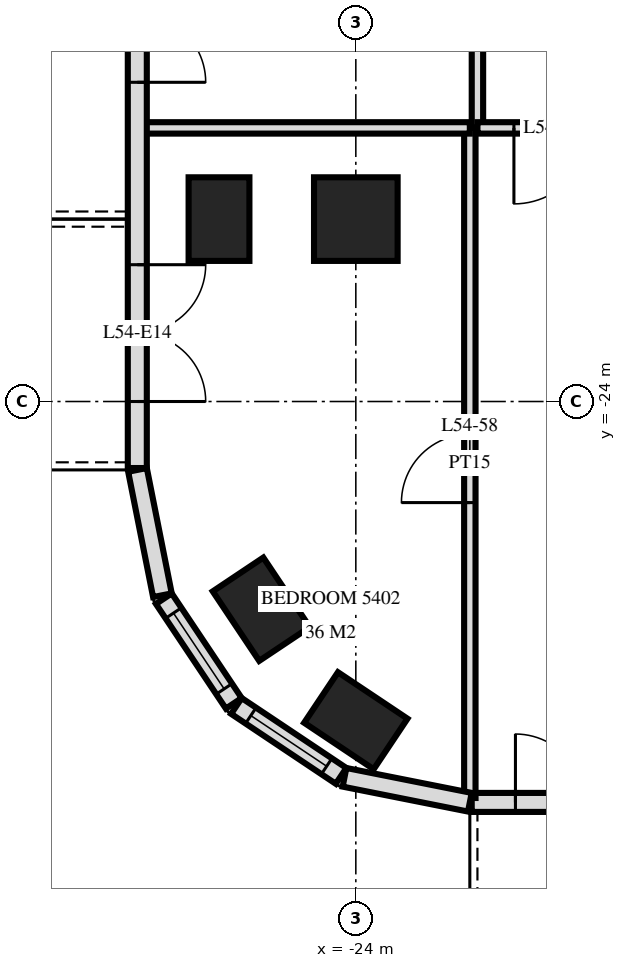
"""IFC4 building model, lengths in metres.
Left out: names, types, materials, properties, quantities, classifications, styles, units other than length and angle.
Written with IfcOpenShell. Run it as: python <this file> out.ifc"""

import sys

from ifc_helpers import new_model, si_unit, direction, frame, frame_2d, origin, origin_2d, place, context, subcontext, project, spatial, rectangle, extrude, element, fill, save


model = new_model("IFC4")
c1 = context("Model", 3, precision=1e-05, world=origin(), true_north=direction((0.0, 1.0)))
c2 = subcontext(c1, "Body", "Model", "MODEL_VIEW")
j1 = project(units=[si_unit("LENGTHUNIT", "METRE"), si_unit("PLANEANGLEUNIT", "RADIAN")], contexts=[c1])
p1 = place(None, origin())
s1 = spatial("IfcSite", under=j1, at=p1, CompositionType="ELEMENT")
p2 = place(p1, origin())
s2 = spatial("IfcBuilding", under=s1, at=p2, CompositionType="ELEMENT")
p3 = place(p2, frame((0.0, 0.0, 208.1)))
s3 = spatial("IfcBuildingStorey", under=s2, at=p3, CompositionType="ELEMENT", Elevation=208.1)
for number, where, z_axis, x_axis in (
    (1, (-25.8, -21.6, 0.0), (0.0, 0.0, 1.0), (0.0, 1.0, 0.0)),
    (2, (-25.244, -26.733, 0.0), (0.0, 0.0, 1.0), (-0.556, 0.831, 0.0)),
    (3, (-24.0, -28.2, 0.0), (0.0, 0.0, 1.0), (-0.831, 0.556, 0.0)),
):
    element("IfcColumn", number, at=place(p3, frame(where, z_axis=z_axis, x_axis=x_axis)), inside=s3, PredefinedType="COLUMN", context=c2, shape_type="SweptSolid", body=[
        extrude(rectangle(XDim=1.1, YDim=0.8, at=origin_2d()), origin(), (0.0, 0.0, 1.0), 3.5),
    ])
p4 = place(p3, frame((-24.0, -21.6, 0.0), z_axis=(0.0, 0.0, 1.0), x_axis=(1.0, 0.0, 0.0)))
e4 = element("IfcColumn", 4, at=p4, inside=s3, PredefinedType="COLUMN", context=c2, shape_type="SweptSolid", body=[
    extrude(rectangle(XDim=1.1, YDim=1.1, at=origin_2d()), origin(), (0.0, 0.0, 1.0), 3.5),
])
p5 = place(p3, frame((-26.875, -3.325, 0.0), z_axis=(0.0, 0.0, 1.0), x_axis=(0.0, -1.0, 0.0)))
e5 = element("IfcWall", 5, at=p5, inside=s3, PredefinedType="SOLIDWALL", context=c2, shape_type="SweptSolid", body=[
    extrude(rectangle(XDim=21.551, YDim=0.25, at=frame_2d((10.775, 0.0))), origin(), (0.0, 0.0, 1.0), 3.22),
])
p6 = place(p5, frame((6.65, 0.0, 0.0)))
e6 = element("IfcOpeningElement", 6, at=p6, cuts=e5, PredefinedType="OPENING", context=c2, shape_type="SweptSolid", body=[
    extrude(rectangle(XDim=1.8, YDim=2.4, at=frame_2d((0.9, 1.2))), frame((0.0, 0.135, 0.0), z_axis=(0.0, -1.0, 0.0), x_axis=(1.0, 0.0, 0.0)), (0.0, 0.0, 1.0), 0.27),
])
p7 = place(p5, frame((12.275, 0.0, 0.9)))
e7 = element("IfcOpeningElement", 7, at=p7, cuts=e5, PredefinedType="OPENING", context=c2, shape_type="SweptSolid", body=[
    extrude(rectangle(XDim=1.2, YDim=1.5, at=frame_2d((0.6, 0.75))), frame((0.0, 0.135, 0.0), z_axis=(0.0, -1.0, 0.0), x_axis=(1.0, 0.0, 0.0)), (0.0, 0.0, 1.0), 0.27),
])
p8 = place(p5, frame((14.675, 0.0, 0.0)))
e8 = element("IfcOpeningElement", 8, at=p8, cuts=e5, PredefinedType="OPENING", context=c2, shape_type="SweptSolid", body=[
    extrude(rectangle(XDim=1.8, YDim=2.4, at=frame_2d((0.9, 1.2))), frame((0.0, 0.135, 0.0), z_axis=(0.0, -1.0, 0.0), x_axis=(1.0, 0.0, 0.0)), (0.0, 0.0, 1.0), 0.27),
])
p9 = place(p5, frame((18.875, 0.0, 0.0)))
e9 = element("IfcOpeningElement", 9, at=p9, cuts=e5, PredefinedType="OPENING", context=c2, shape_type="SweptSolid", body=[
    extrude(rectangle(XDim=1.8, YDim=2.4, at=frame_2d((0.9, 1.2))), frame((0.0, 0.135, 0.0), z_axis=(0.0, -1.0, 0.0), x_axis=(1.0, 0.0, 0.0)), (0.0, 0.0, 1.0), 0.27),
])
p10 = place(p3, frame((-26.873, -24.9, 0.0), z_axis=(0.0, 0.0, 1.0), x_axis=(0.195026884138, -0.980797896849, 0.0)))
e10 = element("IfcWall", 10, at=p10, inside=s3, PredefinedType="SOLIDWALL", context=c2, shape_type="SweptSolid", body=[
    extrude(rectangle(XDim=1.681, YDim=0.25, at=frame_2d((0.841, 0.0))), origin(), (0.0, 0.0, 1.0), 3.22),
])
p11 = place(p3, frame((-26.526, -26.594, 0.0), z_axis=(0.0, 0.0, 1.0), x_axis=(0.55555029066, -0.831482937015, 0.0)))
e11 = element("IfcWall", 11, at=p11, inside=s3, PredefinedType="SOLIDWALL", context=c2, shape_type="SweptSolid", body=[
    extrude(rectangle(XDim=1.656, YDim=0.25, at=frame_2d((0.828, 0.0))), origin(), (0.0, 0.0, 1.0), 3.22),
])
p12 = place(p11, frame((0.228, 0.0, 0.9)))
e12 = element("IfcOpeningElement", 12, at=p12, cuts=e11, PredefinedType="OPENING", context=c2, shape_type="SweptSolid", body=[
    extrude(rectangle(XDim=1.2, YDim=1.5, at=frame_2d((0.6, 0.75))), frame((0.0, 0.135, 0.0), z_axis=(0.0, -1.0, 0.0), x_axis=(1.0, 0.0, 0.0)), (0.0, 0.0, 1.0), 0.27),
])
p13 = place(p3, frame((-25.571, -28.006, 0.0), z_axis=(0.0, 0.0, 1.0), x_axis=(0.831482937015, -0.55555029066, 0.0)))
e13 = element("IfcWall", 13, at=p13, inside=s3, PredefinedType="SOLIDWALL", context=c2, shape_type="SweptSolid", body=[
    extrude(rectangle(XDim=1.656, YDim=0.25, at=frame_2d((0.828, 0.0))), origin(), (0.0, 0.0, 1.0), 3.22),
])
p14 = place(p13, frame((0.228, 0.0, 0.9)))
e14 = element("IfcOpeningElement", 14, at=p14, cuts=e13, PredefinedType="OPENING", context=c2, shape_type="SweptSolid", body=[
    extrude(rectangle(XDim=1.2, YDim=1.5, at=frame_2d((0.6, 0.75))), frame((0.0, 0.135, 0.0), z_axis=(0.0, -1.0, 0.0), x_axis=(1.0, 0.0, 0.0)), (0.0, 0.0, 1.0), 0.27),
])
p15 = place(p3, frame((-24.149, -28.945, 0.0), z_axis=(0.0, 0.0, 1.0), x_axis=(0.980775640221, -0.19513878023, 0.0)))
e15 = element("IfcWall", 15, at=p15, inside=s3, PredefinedType="SOLIDWALL", context=c2, shape_type="SweptSolid", body=[
    extrude(rectangle(XDim=1.681, YDim=0.25, at=frame_2d((0.841, 0.0))), origin(), (0.0, 0.0, 1.0), 3.22),
])
p16 = place(p3, frame((-22.475, -29.275, 0.0), z_axis=(0.0, 0.0, 1.0), x_axis=(1.0, 0.0, 0.0)))
e16 = element("IfcWall", 16, at=p16, inside=s3, PredefinedType="SOLIDWALL", context=c2, shape_type="SweptSolid", body=[
    extrude(rectangle(XDim=44.951, YDim=0.25, at=frame_2d((22.475, 0.0))), origin(), (0.0, 0.0, 1.0), 3.22),
])
p17 = place(p16, frame((0.575, 0.0, 0.0)))
e17 = element("IfcOpeningElement", 17, at=p17, cuts=e16, PredefinedType="OPENING", context=c2, shape_type="SweptSolid", body=[
    extrude(rectangle(XDim=1.8, YDim=2.4, at=frame_2d((0.9, 1.2))), frame((0.0, 0.135, 0.0), z_axis=(0.0, -1.0, 0.0), x_axis=(1.0, 0.0, 0.0)), (0.0, 0.0, 1.0), 0.27),
])
p18 = place(p16, frame((6.2, 0.0, 0.0)))
e18 = element("IfcOpeningElement", 18, at=p18, cuts=e16, PredefinedType="OPENING", context=c2, shape_type="SweptSolid", body=[
    extrude(rectangle(XDim=1.8, YDim=2.4, at=frame_2d((0.9, 1.2))), frame((0.0, 0.135, 0.0), z_axis=(0.0, -1.0, 0.0), x_axis=(1.0, 0.0, 0.0)), (0.0, 0.0, 1.0), 0.27),
])
p19 = place(p16, frame((8.45, 0.0, 0.9)))
e19 = element("IfcOpeningElement", 19, at=p19, cuts=e16, PredefinedType="OPENING", context=c2, shape_type="SweptSolid", body=[
    extrude(rectangle(XDim=1.8, YDim=1.5, at=frame_2d((0.9, 0.75))), frame((0.0, 0.135, 0.0), z_axis=(0.0, -1.0, 0.0), x_axis=(1.0, 0.0, 0.0)), (0.0, 0.0, 1.0), 0.27),
])
p20 = place(p16, frame((11.075, 0.0, 0.0)))
e20 = element("IfcOpeningElement", 20, at=p20, cuts=e16, PredefinedType="OPENING", context=c2, shape_type="SweptSolid", body=[
    extrude(rectangle(XDim=1.8, YDim=2.4, at=frame_2d((0.9, 1.2))), frame((0.0, 0.135, 0.0), z_axis=(0.0, -1.0, 0.0), x_axis=(1.0, 0.0, 0.0)), (0.0, 0.0, 1.0), 0.27),
])
p21 = place(p16, frame((13.775, 0.0, 0.9)))
e21 = element("IfcOpeningElement", 21, at=p21, cuts=e16, PredefinedType="OPENING", context=c2, shape_type="SweptSolid", body=[
    extrude(rectangle(XDim=2.4, YDim=1.5, at=frame_2d((1.2, 0.75))), frame((0.0, 0.135, 0.0), z_axis=(0.0, -1.0, 0.0), x_axis=(1.0, 0.0, 0.0)), (0.0, 0.0, 1.0), 0.27),
])
p22 = place(p16, frame((16.775, 0.0, 0.9)))
e22 = element("IfcOpeningElement", 22, at=p22, cuts=e16, PredefinedType="OPENING", context=c2, shape_type="SweptSolid", body=[
    extrude(rectangle(XDim=2.4, YDim=1.5, at=frame_2d((1.2, 0.75))), frame((0.0, 0.135, 0.0), z_axis=(0.0, -1.0, 0.0), x_axis=(1.0, 0.0, 0.0)), (0.0, 0.0, 1.0), 0.27),
])
p23 = place(p16, frame((20.075, 0.0, 0.0)))
e23 = element("IfcOpeningElement", 23, at=p23, cuts=e16, PredefinedType="OPENING", context=c2, shape_type="SweptSolid", body=[
    extrude(rectangle(XDim=1.8, YDim=2.4, at=frame_2d((0.9, 1.2))), frame((0.0, 0.135, 0.0), z_axis=(0.0, -1.0, 0.0), x_axis=(1.0, 0.0, 0.0)), (0.0, 0.0, 1.0), 0.27),
])
p24 = place(p16, frame((23.075, 0.0, 0.0)))
e24 = element("IfcOpeningElement", 24, at=p24, cuts=e16, PredefinedType="OPENING", context=c2, shape_type="SweptSolid", body=[
    extrude(rectangle(XDim=1.8, YDim=2.4, at=frame_2d((0.9, 1.2))), frame((0.0, 0.135, 0.0), z_axis=(0.0, -1.0, 0.0), x_axis=(1.0, 0.0, 0.0)), (0.0, 0.0, 1.0), 0.27),
])
p25 = place(p16, frame((25.775, 0.0, 0.9)))
e25 = element("IfcOpeningElement", 25, at=p25, cuts=e16, PredefinedType="OPENING", context=c2, shape_type="SweptSolid", body=[
    extrude(rectangle(XDim=2.4, YDim=1.5, at=frame_2d((1.2, 0.75))), frame((0.0, 0.135, 0.0), z_axis=(0.0, -1.0, 0.0), x_axis=(1.0, 0.0, 0.0)), (0.0, 0.0, 1.0), 0.27),
])
p26 = place(p16, frame((29.075, 0.0, 0.0)))
e26 = element("IfcOpeningElement", 26, at=p26, cuts=e16, PredefinedType="OPENING", context=c2, shape_type="SweptSolid", body=[
    extrude(rectangle(XDim=1.8, YDim=2.4, at=frame_2d((0.9, 1.2))), frame((0.0, 0.135, 0.0), z_axis=(0.0, -1.0, 0.0), x_axis=(1.0, 0.0, 0.0)), (0.0, 0.0, 1.0), 0.27),
])
p27 = place(p16, frame((31.775, 0.0, 0.9)))
e27 = element("IfcOpeningElement", 27, at=p27, cuts=e16, PredefinedType="OPENING", context=c2, shape_type="SweptSolid", body=[
    extrude(rectangle(XDim=2.4, YDim=1.5, at=frame_2d((1.2, 0.75))), frame((0.0, 0.135, 0.0), z_axis=(0.0, -1.0, 0.0), x_axis=(1.0, 0.0, 0.0)), (0.0, 0.0, 1.0), 0.27),
])
p28 = place(p16, frame((34.775, 0.0, 0.9)))
e28 = element("IfcOpeningElement", 28, at=p28, cuts=e16, PredefinedType="OPENING", context=c2, shape_type="SweptSolid", body=[
    extrude(rectangle(XDim=2.4, YDim=1.5, at=frame_2d((1.2, 0.75))), frame((0.0, 0.135, 0.0), z_axis=(0.0, -1.0, 0.0), x_axis=(1.0, 0.0, 0.0)), (0.0, 0.0, 1.0), 0.27),
])
p29 = place(p16, frame((38.075, 0.0, 0.0)))
e29 = element("IfcOpeningElement", 29, at=p29, cuts=e16, PredefinedType="OPENING", context=c2, shape_type="SweptSolid", body=[
    extrude(rectangle(XDim=1.8, YDim=2.4, at=frame_2d((0.9, 1.2))), frame((0.0, 0.135, 0.0), z_axis=(0.0, -1.0, 0.0), x_axis=(1.0, 0.0, 0.0)), (0.0, 0.0, 1.0), 0.27),
])
p30 = place(p16, frame((41.075, 0.0, 0.0)))
e30 = element("IfcOpeningElement", 30, at=p30, cuts=e16, PredefinedType="OPENING", context=c2, shape_type="SweptSolid", body=[
    extrude(rectangle(XDim=1.8, YDim=2.4, at=frame_2d((0.9, 1.2))), frame((0.0, 0.135, 0.0), z_axis=(0.0, -1.0, 0.0), x_axis=(1.0, 0.0, 0.0)), (0.0, 0.0, 1.0), 0.27),
])
p31 = place(p3, frame((-22.4, -20.4, 0.0), z_axis=(0.0, 0.0, 1.0), x_axis=(0.0, 1.0, 0.0)))
e31 = element("IfcWall", 31, at=p31, inside=s3, PredefinedType="PARTITIONING", context=c2, shape_type="SweptSolid", body=[
    extrude(rectangle(XDim=3.0, YDim=0.15, at=frame_2d((1.5, 0.0))), origin(), (0.0, 0.0, 1.0), 3.22),
])
p32 = place(p3, frame((-22.5, -29.217, 0.0), z_axis=(0.0, 0.0, 1.0), x_axis=(0.0, 1.0, 0.0)))
e32 = element("IfcWall", 32, at=p32, inside=s3, PredefinedType="PARTITIONING", context=c2, shape_type="SweptSolid", body=[
    extrude(rectangle(XDim=8.817, YDim=0.15, at=frame_2d((4.408, 0.0))), origin(), (0.0, 0.0, 1.0), 3.22),
])
p33 = place(p32, frame((3.886, 0.0, 0.0)))
e33 = element("IfcOpeningElement", 33, at=p33, cuts=e32, PredefinedType="OPENING", context=c2, shape_type="SweptSolid", body=[
    extrude(rectangle(XDim=0.9, YDim=2.1, at=frame_2d((0.45, 1.05))), frame((0.0, 0.085, 0.0), z_axis=(0.0, -1.0, 0.0), x_axis=(1.0, 0.0, 0.0)), (0.0, 0.0, 1.0), 0.17),
])
p34 = place(p3, frame((-22.4, -20.4, 0.0), z_axis=(0.0, 0.0, 1.0), x_axis=(1.0, 0.0, 0.0)))
e34 = element("IfcWall", 34, at=p34, inside=s3, PredefinedType="PARTITIONING", context=c2, shape_type="SweptSolid", body=[
    extrude(rectangle(XDim=2.0, YDim=0.15, at=frame_2d((1.0, 0.0))), origin(), (0.0, 0.0, 1.0), 3.22),
])
p35 = place(p34, frame((0.48, 0.0, 0.0)))
e35 = element("IfcOpeningElement", 35, at=p35, cuts=e34, PredefinedType="OPENING", context=c2, shape_type="SweptSolid", body=[
    extrude(rectangle(XDim=1.0, YDim=2.1, at=frame_2d((0.5, 1.05))), frame((0.0, 0.085, 0.0), z_axis=(0.0, -1.0, 0.0), x_axis=(1.0, 0.0, 0.0)), (0.0, 0.0, 1.0), 0.17),
])
p36 = place(p3, frame((-26.82, -20.4, 0.0), z_axis=(0.0, 0.0, 1.0), x_axis=(1.0, 0.0, 0.0)))
e36 = element("IfcWall", 36, at=p36, inside=s3, PredefinedType="PARTITIONING", context=c2, shape_type="SweptSolid", body=[
    extrude(rectangle(XDim=4.32, YDim=0.15, at=frame_2d((2.16, 0.0))), origin(), (0.0, 0.0, 1.0), 3.22),
])
p37 = place(p12, origin())
e37 = element("IfcWindow", 37, at=p37, inside=s3, PartitioningType="SINGLE_PANEL", PredefinedType="WINDOW", context=c2, shape_type="SweptSolid", body=[
    extrude(rectangle(XDim=1.2, YDim=1.5, at=frame_2d((0.6, 0.75))), frame((0.0, 0.03, 0.0), z_axis=(0.0, -1.0, 0.0), x_axis=(1.0, 0.0, 0.0)), (0.0, 0.0, 1.0), 0.06),
])
fill(e12, e37)
p38 = place(p14, origin())
e38 = element("IfcWindow", 38, at=p38, inside=s3, PartitioningType="SINGLE_PANEL", PredefinedType="WINDOW", context=c2, shape_type="SweptSolid", body=[
    extrude(rectangle(XDim=1.2, YDim=1.5, at=frame_2d((0.6, 0.75))), frame((0.0, 0.03, 0.0), z_axis=(0.0, -1.0, 0.0), x_axis=(1.0, 0.0, 0.0)), (0.0, 0.0, 1.0), 0.06),
])
fill(e14, e38)
p39 = place(p17, origin())
e39 = element("IfcDoor", 39, at=p39, inside=s3, OperationType="DOUBLE_DOOR_SINGLE_SWING", PredefinedType="DOOR", context=c2, shape_type="SweptSolid", body=[
    extrude(rectangle(XDim=1.8, YDim=2.4, at=frame_2d((0.9, 1.2))), frame((0.0, 0.025, 0.0), z_axis=(0.0, -1.0, 0.0), x_axis=(1.0, 0.0, 0.0)), (0.0, 0.0, 1.0), 0.05),
])
fill(e17, e39)
p40 = place(p8, origin())
e40 = element("IfcDoor", 40, at=p40, inside=s3, OperationType="DOUBLE_DOOR_SINGLE_SWING", PredefinedType="DOOR", context=c2, shape_type="SweptSolid", body=[
    extrude(rectangle(XDim=1.8, YDim=2.4, at=frame_2d((0.9, 1.2))), frame((0.0, 0.025, 0.0), z_axis=(0.0, -1.0, 0.0), x_axis=(1.0, 0.0, 0.0)), (0.0, 0.0, 1.0), 0.05),
])
fill(e8, e40)
p41 = place(p9, origin())
e41 = element("IfcDoor", 41, at=p41, inside=s3, OperationType="DOUBLE_DOOR_SINGLE_SWING", PredefinedType="DOOR", context=c2, shape_type="SweptSolid", body=[
    extrude(rectangle(XDim=1.8, YDim=2.4, at=frame_2d((0.9, 1.2))), frame((0.0, 0.025, 0.0), z_axis=(0.0, -1.0, 0.0), x_axis=(1.0, 0.0, 0.0)), (0.0, 0.0, 1.0), 0.05),
])
fill(e9, e41)
p42 = place(p35, frame((0.5, 0.0, 0.0), z_axis=(0.0, 0.0, 1.0), x_axis=(-1.0, 0.0, 0.0)))
e42 = element("IfcDoor", 42, at=p42, inside=s3, OperationType="SINGLE_SWING_LEFT", PredefinedType="DOOR", context=c2, shape_type="SweptSolid", body=[
    extrude(rectangle(XDim=1.0, YDim=2.1, at=frame_2d((0.0, 1.05))), frame((0.0, -0.025, 0.0), z_axis=(0.0, 1.0, 0.0), x_axis=(-1.0, 0.0, 0.0)), (0.0, 0.0, 1.0), 0.05),
])
fill(e35, e42)
p43 = place(p33, origin())
e43 = element("IfcDoor", 43, at=p43, inside=s3, OperationType="SINGLE_SWING_RIGHT", PredefinedType="DOOR", context=c2, shape_type="SweptSolid", body=[
    extrude(rectangle(XDim=0.9, YDim=2.1, at=frame_2d((0.45, 1.05))), frame((0.0, 0.025, 0.0), z_axis=(0.0, -1.0, 0.0), x_axis=(1.0, 0.0, 0.0)), (0.0, 0.0, 1.0), 0.05),
])
fill(e33, e43)
save(model, sys.argv[1])
